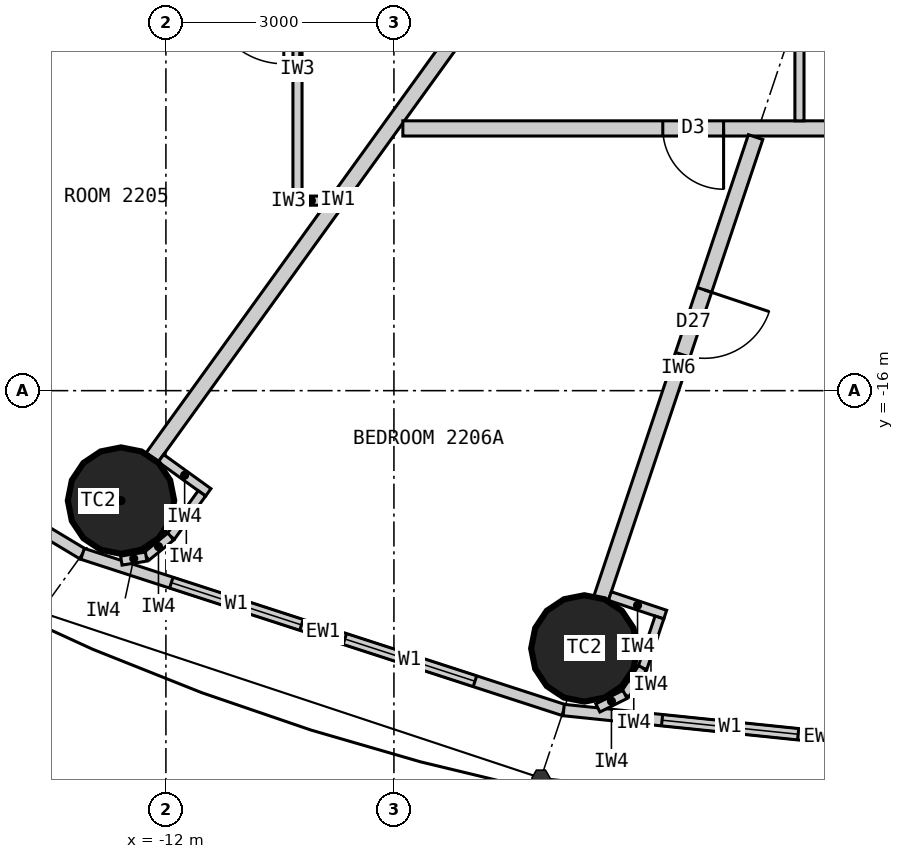
"""IFC4 building model, lengths in metres.
Left out: names, types, materials, properties, quantities, classifications, styles, units other than length and angle.
Written with IfcOpenShell. Run it as: python <this file> out.ifc"""

import sys

from ifc_helpers import new_model, si_unit, direction, frame, frame_2d, origin, origin_2d, place, context, subcontext, project, spatial, rectangle, circle, extrude, element, fill, save


model = new_model("IFC4")
c1 = context("Model", 3, precision=1e-05, world=origin(), true_north=direction((0.0, 1.0)))
c2 = subcontext(c1, "Body", "Model", "MODEL_VIEW")
j1 = project(units=[si_unit("LENGTHUNIT", "METRE"), si_unit("PLANEANGLEUNIT", "RADIAN")], contexts=[c1])
p1 = place(None, origin())
s1 = spatial("IfcSite", under=j1, at=p1, CompositionType="ELEMENT")
p2 = place(p1, origin())
s2 = spatial("IfcBuilding", under=s1, at=p2, CompositionType="ELEMENT")
p3 = place(p2, frame((0.0, 0.0, 87.0)))
s3 = spatial("IfcBuildingStorey", under=s2, at=p3, CompositionType="ELEMENT", Elevation=87.0)
for number, where, z_axis, x_axis in (
    (1, (-12.591, -17.447, 0.0), (0.0, 0.0, 1.0), (1.0, 0.0, 0.0)),
    (2, (-6.495, -19.391, 0.0), (0.0, 0.0, 1.0), (1.0, 0.0, 0.0)),
):
    element("IfcColumn", number, at=place(p3, frame(where, z_axis=z_axis, x_axis=x_axis)), inside=s3, PredefinedType="COLUMN", context=c2, shape_type="SweptSolid", body=[
        extrude(circle(Radius=0.7, at=origin_2d()), origin(), (0.0, 0.0, 1.0), 3.3),
    ])
p4 = place(p3, frame((-18.57, -14.856, 0.0), z_axis=(0.0, 0.0, 1.0), x_axis=(0.856983180864, -0.515344377787, 0.0)))
e3 = element("IfcWall", 3, at=p4, inside=s3, PredefinedType="ELEMENTEDWALL", context=c2, shape_type="SweptSolid", body=[
    extrude(rectangle(XDim=6.386, YDim=0.15, at=frame_2d((3.193, 0.0))), origin(), (0.0, 0.0, 1.0), 3.12),
])
p5 = place(p4, frame((1.093, 0.0, 0.9)))
e4 = element("IfcOpeningElement", 4, at=p5, cuts=e3, PredefinedType="OPENING", context=c2, shape_type="SweptSolid", body=[
    extrude(rectangle(XDim=1.8, YDim=1.9, at=frame_2d((0.9, 0.95))), frame((0.0, 0.085, 0.0), z_axis=(0.0, -1.0, 0.0), x_axis=(1.0, 0.0, 0.0)), (0.0, 0.0, 1.0), 0.17),
])
p6 = place(p4, frame((3.493, 0.0, 0.9)))
e5 = element("IfcOpeningElement", 5, at=p6, cuts=e3, PredefinedType="OPENING", context=c2, shape_type="SweptSolid", body=[
    extrude(rectangle(XDim=1.8, YDim=1.9, at=frame_2d((0.9, 0.95))), frame((0.0, 0.085, 0.0), z_axis=(0.0, -1.0, 0.0), x_axis=(1.0, 0.0, 0.0)), (0.0, 0.0, 1.0), 0.17),
])
p7 = place(p3, frame((-13.096, -18.147, 0.0), z_axis=(0.0, 0.0, 1.0), x_axis=(0.951137534625, -0.308767534285, 0.0)))
e6 = element("IfcWall", 6, at=p7, inside=s3, PredefinedType="ELEMENTEDWALL", context=c2, shape_type="SweptSolid", body=[
    extrude(rectangle(XDim=6.655, YDim=0.15, at=frame_2d((3.328, 0.0))), origin(), (0.0, 0.0, 1.0), 3.12),
])
p8 = place(p7, frame((1.228, 0.0, 0.9)))
e7 = element("IfcOpeningElement", 7, at=p8, cuts=e6, PredefinedType="OPENING", context=c2, shape_type="SweptSolid", body=[
    extrude(rectangle(XDim=1.8, YDim=1.9, at=frame_2d((0.9, 0.95))), frame((0.0, 0.085, 0.0), z_axis=(0.0, -1.0, 0.0), x_axis=(1.0, 0.0, 0.0)), (0.0, 0.0, 1.0), 0.17),
])
p9 = place(p7, frame((3.628, 0.0, 0.9)))
e8 = element("IfcOpeningElement", 8, at=p9, cuts=e6, PredefinedType="OPENING", context=c2, shape_type="SweptSolid", body=[
    extrude(rectangle(XDim=1.8, YDim=1.9, at=frame_2d((0.9, 0.95))), frame((0.0, 0.085, 0.0), z_axis=(0.0, -1.0, 0.0), x_axis=(1.0, 0.0, 0.0)), (0.0, 0.0, 1.0), 0.17),
])
p10 = place(p3, frame((-6.766, -20.202, 0.0), z_axis=(0.0, 0.0, 1.0), x_axis=(0.994721394369, -0.102612609291, 0.0)))
e9 = element("IfcWall", 9, at=p10, inside=s3, PredefinedType="ELEMENTEDWALL", context=c2, shape_type="SweptSolid", body=[
    extrude(rectangle(XDim=6.802, YDim=0.15, at=frame_2d((3.401, 0.0))), origin(), (0.0, 0.0, 1.0), 3.12),
])
p11 = place(p10, frame((1.301, 0.0, 0.9)))
e10 = element("IfcOpeningElement", 10, at=p11, cuts=e9, PredefinedType="OPENING", context=c2, shape_type="SweptSolid", body=[
    extrude(rectangle(XDim=1.8, YDim=1.9, at=frame_2d((0.9, 0.95))), frame((0.0, 0.085, 0.0), z_axis=(0.0, -1.0, 0.0), x_axis=(1.0, 0.0, 0.0)), (0.0, 0.0, 1.0), 0.17),
])
p12 = place(p10, frame((3.701, 0.0, 0.9)))
e11 = element("IfcOpeningElement", 11, at=p12, cuts=e9, PredefinedType="OPENING", context=c2, shape_type="SweptSolid", body=[
    extrude(rectangle(XDim=1.8, YDim=1.9, at=frame_2d((0.9, 0.95))), frame((0.0, 0.085, 0.0), z_axis=(0.0, -1.0, 0.0), x_axis=(1.0, 0.0, 0.0)), (0.0, 0.0, 1.0), 0.17),
])
p13 = place(p3, frame((-7.289, -10.1, 0.0), z_axis=(0.0, 0.0, 1.0), x_axis=(-0.585198353053, -0.810890182197, 0.0)))
e12 = element("IfcWall", 12, at=p13, inside=s3, PredefinedType="PARTITIONING", context=c2, shape_type="SweptSolid", body=[
    extrude(rectangle(XDim=8.36, YDim=0.2, at=frame_2d((4.18, 0.0))), origin(), (0.0, 0.0, 1.0), 2.27),
])
p14 = place(p3, frame((-9.843, -13.5, 0.0), z_axis=(0.0, 0.0, 1.0), x_axis=(-1.0, 0.0, 0.0)))
e13 = element("IfcWall", 13, at=p14, inside=s3, PredefinedType="PARTITIONING", context=c2, shape_type="SweptSolid", body=[
    extrude(rectangle(XDim=0.486, YDim=0.12, at=frame_2d((0.243, 0.0))), origin(), (0.0, 0.0, 1.0), 3.12),
])
p15 = place(p3, frame((-10.269, -10.1, 0.0), z_axis=(0.0, 0.0, 1.0), x_axis=(0.0, -1.0, 0.0)))
e14 = element("IfcWall", 14, at=p15, inside=s3, PredefinedType="PARTITIONING", context=c2, shape_type="SweptSolid", body=[
    extrude(rectangle(XDim=3.34, YDim=0.12, at=frame_2d((1.67, 0.0))), origin(), (0.0, 0.0, 1.0), 3.12),
])
p16 = place(p15, frame((0.8, 0.0, 0.0)))
e15 = element("IfcOpeningElement", 15, at=p16, cuts=e14, PredefinedType="OPENING", context=c2, shape_type="SweptSolid", body=[
    extrude(rectangle(XDim=0.9, YDim=2.1, at=frame_2d((0.45, 1.05))), frame((0.0, 0.07, 0.0), z_axis=(0.0, -1.0, 0.0), x_axis=(1.0, 0.0, 0.0)), (0.0, 0.0, 1.0), 0.14),
])
p17 = place(p3, frame((-8.883, -12.55, 0.0), z_axis=(0.0, 0.0, 1.0), x_axis=(1.0, 0.0, 0.0)))
e16 = element("IfcWall", 16, at=p17, inside=s3, PredefinedType="PARTITIONING", context=c2, shape_type="SweptSolid", body=[
    extrude(rectangle(XDim=17.765, YDim=0.2, at=frame_2d((8.883, 0.0))), origin(), (0.0, 0.0, 1.0), 3.12),
])
p18 = place(p17, frame((3.42, 0.0, 0.0)))
e17 = element("IfcOpeningElement", 17, at=p18, cuts=e16, PredefinedType="OPENING", context=c2, shape_type="SweptSolid", body=[
    extrude(rectangle(XDim=0.8, YDim=2.1, at=frame_2d((0.4, 1.05))), frame((0.0, 0.11, 0.0), z_axis=(0.0, -1.0, 0.0), x_axis=(1.0, 0.0, 0.0)), (0.0, 0.0, 1.0), 0.22),
])
p19 = place(p17, frame((13.52, 0.0, 0.0)))
e18 = element("IfcOpeningElement", 18, at=p19, cuts=e16, PredefinedType="OPENING", context=c2, shape_type="SweptSolid", body=[
    extrude(rectangle(XDim=0.8, YDim=2.1, at=frame_2d((0.4, 1.05))), frame((0.0, 0.11, 0.0), z_axis=(0.0, -1.0, 0.0), x_axis=(1.0, 0.0, 0.0)), (0.0, 0.0, 1.0), 0.22),
])
p20 = place(p17, frame((8.42, 0.0, 0.0)))
e19 = element("IfcOpeningElement", 19, at=p20, cuts=e16, PredefinedType="OPENING", context=c2, shape_type="SweptSolid", body=[
    extrude(rectangle(XDim=0.9, YDim=2.1, at=frame_2d((0.45, 1.05))), frame((0.0, 0.11, 0.0), z_axis=(0.0, -1.0, 0.0), x_axis=(1.0, 0.0, 0.0)), (0.0, 0.0, 1.0), 0.22),
])
p21 = place(p3, frame((-4.242, -12.664, 0.0), z_axis=(0.0, 0.0, 1.0), x_axis=(-0.317590505374, -0.94822796357, 0.0)))
e20 = element("IfcWall", 20, at=p21, inside=s3, PredefinedType="PARTITIONING", context=c2, shape_type="SweptSolid", body=[
    extrude(rectangle(XDim=6.394, YDim=0.2, at=frame_2d((3.197, 0.0))), origin(), (0.0, 0.0, 1.0), 2.27),
])
p22 = place(p21, frame((2.12, 0.0, 0.0)))
e21 = element("IfcOpeningElement", 21, at=p22, cuts=e20, PredefinedType="OPENING", context=c2, shape_type="SweptSolid", body=[
    extrude(rectangle(XDim=0.9, YDim=2.1, at=frame_2d((0.45, 1.05))), frame((0.0, 0.11, 0.0), z_axis=(0.0, -1.0, 0.0), x_axis=(1.0, 0.0, 0.0)), (0.0, 0.0, 1.0), 0.22),
])
p23 = place(p3, frame((-3.665, -10.1, 0.0), z_axis=(0.0, 0.0, 1.0), x_axis=(0.0, -1.0, 0.0)))
e22 = element("IfcWall", 22, at=p23, inside=s3, PredefinedType="PARTITIONING", context=c2, shape_type="SweptSolid", body=[
    extrude(rectangle(XDim=2.35, YDim=0.12, at=frame_2d((1.175, 0.0))), origin(), (0.0, 0.0, 1.0), 3.12),
])
p24 = place(p3, frame((-12.065, -16.889, 0.0), z_axis=(0.0, 0.0, 1.0), x_axis=(0.810821798253, -0.585293098778, 0.0)))
e23 = element("IfcWall", 23, at=p24, inside=s3, PredefinedType="PARTITIONING", context=c2, shape_type="SweptSolid", body=[
    extrude(rectangle(XDim=0.768, YDim=0.12, at=frame_2d((0.384, 0.0))), origin(), (0.0, 0.0, 1.0), 3.12),
])
p25 = place(p3, frame((-11.526, -17.351, 0.0), z_axis=(0.0, 0.0, 1.0), x_axis=(-0.585223113993, -0.810872312296, 0.0)))
e24 = element("IfcWall", 24, at=p25, inside=s3, PredefinedType="PARTITIONING", context=c2, shape_type="SweptSolid", body=[
    extrude(rectangle(XDim=0.7, YDim=0.12, at=frame_2d((0.35, 0.0))), origin(), (0.0, 0.0, 1.0), 3.12),
])
p26 = place(p3, frame((-11.936, -17.919, 0.0), z_axis=(0.0, 0.0, 1.0), x_axis=(-0.775023088441, -0.631932917629, 0.0)))
e25 = element("IfcWall", 25, at=p26, inside=s3, PredefinedType="PARTITIONING", context=c2, shape_type="SweptSolid", body=[
    extrude(rectangle(XDim=0.418, YDim=0.12, at=frame_2d((0.209, 0.0))), origin(), (0.0, 0.0, 1.0), 3.12),
])
p27 = place(p3, frame((-12.26, -18.183, 0.0), z_axis=(0.0, 0.0, 1.0), x_axis=(-0.987218661664, -0.159371622511, 0.0)))
e26 = element("IfcWall", 26, at=p27, inside=s3, PredefinedType="PARTITIONING", context=c2, shape_type="SweptSolid", body=[
    extrude(rectangle(XDim=0.331, YDim=0.12, at=frame_2d((0.166, 0.0))), origin(), (0.0, 0.0, 1.0), 3.12),
])
p28 = place(p3, frame((-6.159, -18.702, 0.0), z_axis=(0.0, 0.0, 1.0), x_axis=(0.948173154049, -0.31775410295, 0.0)))
e27 = element("IfcWall", 27, at=p28, inside=s3, PredefinedType="PARTITIONING", context=c2, shape_type="SweptSolid", body=[
    extrude(rectangle(XDim=0.768, YDim=0.12, at=frame_2d((0.384, 0.0))), origin(), (0.0, 0.0, 1.0), 3.12),
])
p29 = place(p3, frame((-5.507, -18.984, 0.0), z_axis=(0.0, 0.0, 1.0), x_axis=(-0.317692050622, -0.948193946918, 0.0)))
e28 = element("IfcWall", 28, at=p29, inside=s3, PredefinedType="PARTITIONING", context=c2, shape_type="SweptSolid", body=[
    extrude(rectangle(XDim=0.7, YDim=0.12, at=frame_2d((0.35, 0.0))), origin(), (0.0, 0.0, 1.0), 3.12),
])
p30 = place(p3, frame((-5.729, -19.648, 0.0), z_axis=(0.0, 0.0, 1.0), x_axis=(-0.552135764955, -0.833754218615, 0.0)))
e29 = element("IfcWall", 29, at=p30, inside=s3, PredefinedType="PARTITIONING", context=c2, shape_type="SweptSolid", body=[
    extrude(rectangle(XDim=0.418, YDim=0.12, at=frame_2d((0.209, 0.0))), origin(), (0.0, 0.0, 1.0), 3.12),
])
p31 = place(p3, frame((-5.96, -19.996, 0.0), z_axis=(0.0, 0.0, 1.0), x_axis=(-0.895160725913, -0.445743507842, 0.0)))
e30 = element("IfcWall", 30, at=p31, inside=s3, PredefinedType="PARTITIONING", context=c2, shape_type="SweptSolid", body=[
    extrude(rectangle(XDim=0.399, YDim=0.12, at=frame_2d((0.199, 0.0))), origin(), (0.0, 0.0, 1.0), 3.12),
])
p32 = place(p8, origin())
e31 = element("IfcWindow", 31, at=p32, inside=s3, PartitioningType="SINGLE_PANEL", PredefinedType="WINDOW", context=c2, shape_type="SweptSolid", body=[
    extrude(rectangle(XDim=1.8, YDim=1.9, at=frame_2d((0.9, 0.95))), frame((0.0, 0.03, 0.0), z_axis=(0.0, -1.0, 0.0), x_axis=(1.0, 0.0, 0.0)), (0.0, 0.0, 1.0), 0.06),
])
fill(e7, e31)
p33 = place(p9, origin())
e32 = element("IfcWindow", 32, at=p33, inside=s3, PartitioningType="SINGLE_PANEL", PredefinedType="WINDOW", context=c2, shape_type="SweptSolid", body=[
    extrude(rectangle(XDim=1.8, YDim=1.9, at=frame_2d((0.9, 0.95))), frame((0.0, 0.03, 0.0), z_axis=(0.0, -1.0, 0.0), x_axis=(1.0, 0.0, 0.0)), (0.0, 0.0, 1.0), 0.06),
])
fill(e8, e32)
p34 = place(p11, origin())
e33 = element("IfcWindow", 33, at=p34, inside=s3, PartitioningType="SINGLE_PANEL", PredefinedType="WINDOW", context=c2, shape_type="SweptSolid", body=[
    extrude(rectangle(XDim=1.8, YDim=1.9, at=frame_2d((0.9, 0.95))), frame((0.0, 0.03, 0.0), z_axis=(0.0, -1.0, 0.0), x_axis=(1.0, 0.0, 0.0)), (0.0, 0.0, 1.0), 0.06),
])
fill(e10, e33)
p35 = place(p16, origin())
e34 = element("IfcDoor", 34, at=p35, inside=s3, OperationType="SLIDING_TO_LEFT", PredefinedType="DOOR", context=c2, shape_type="SweptSolid", body=[
    extrude(rectangle(XDim=0.9, YDim=2.1, at=frame_2d((0.45, 1.05))), frame((0.0, 0.025, 0.0), z_axis=(0.0, -1.0, 0.0), x_axis=(1.0, 0.0, 0.0)), (0.0, 0.0, 1.0), 0.05),
])
fill(e15, e34)
p36 = place(p18, origin())
e35 = element("IfcDoor", 35, at=p36, inside=s3, OperationType="SINGLE_SWING_RIGHT", PredefinedType="DOOR", context=c2, shape_type="SweptSolid", body=[
    extrude(rectangle(XDim=0.8, YDim=2.1, at=frame_2d((0.4, 1.05))), frame((0.0, 0.025, 0.0), z_axis=(0.0, -1.0, 0.0), x_axis=(1.0, 0.0, 0.0)), (0.0, 0.0, 1.0), 0.05),
])
fill(e17, e35)
p37 = place(p22, origin())
e36 = element("IfcDoor", 36, at=p37, inside=s3, OperationType="SINGLE_SWING_LEFT", PredefinedType="DOOR", context=c2, shape_type="SweptSolid", body=[
    extrude(rectangle(XDim=0.9, YDim=2.1, at=frame_2d((0.45, 1.05))), frame((0.0, 0.025, 0.0), z_axis=(0.0, -1.0, 0.0), x_axis=(1.0, 0.0, 0.0)), (0.0, 0.0, 1.0), 0.05),
])
fill(e21, e36)
save(model, sys.argv[1])
